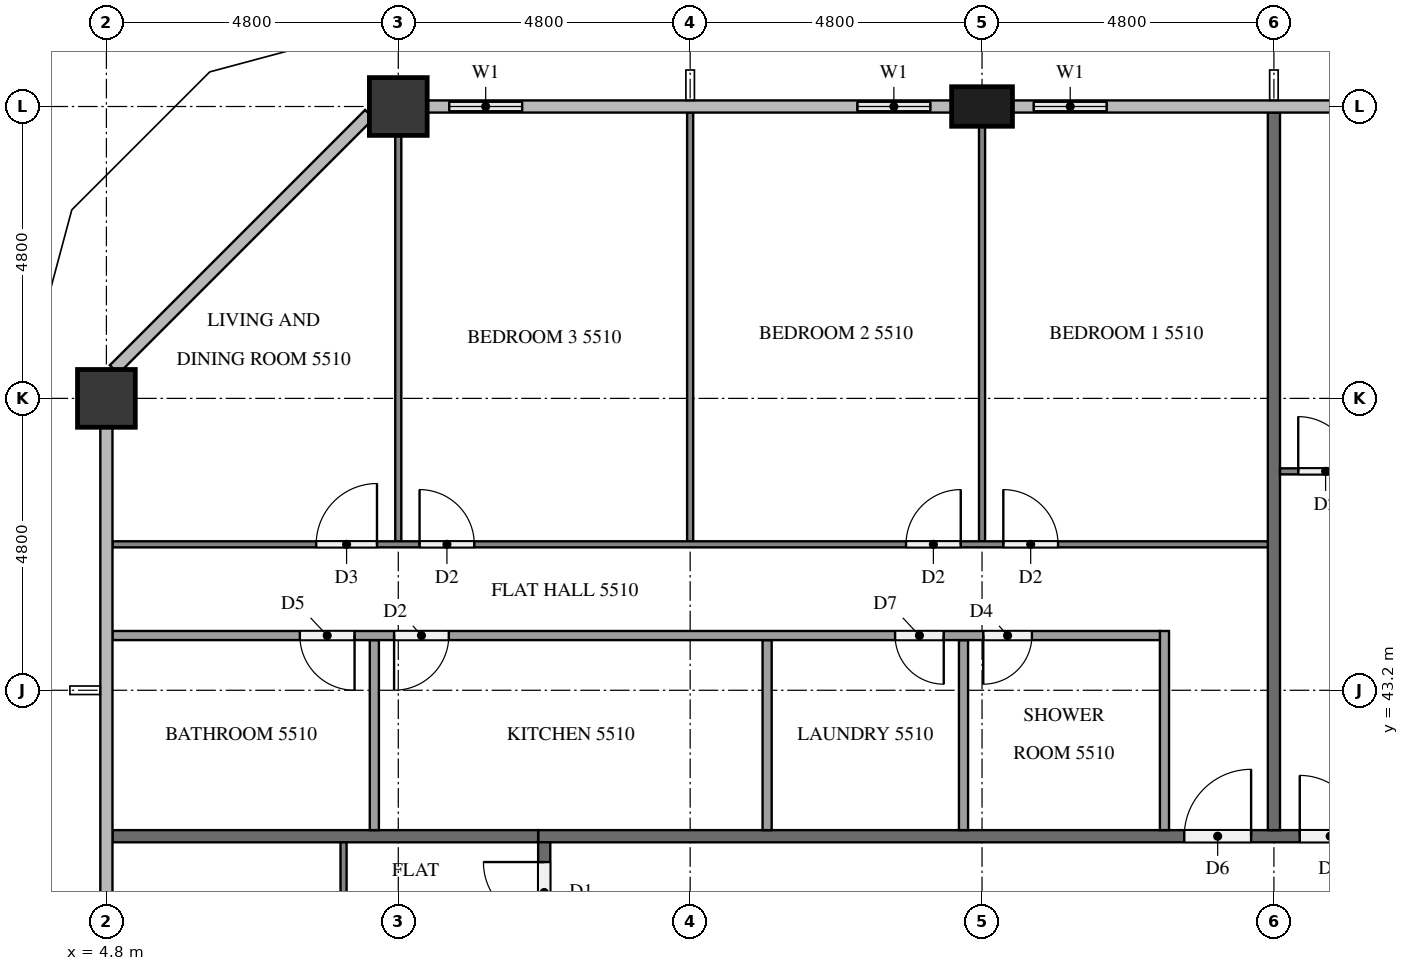
"""IFC4 building model, lengths in metres.
Left out: names, types, materials, properties, quantities, classifications, styles, units other than length and angle.
Written with IfcOpenShell. Run it as: python <this file> out.ifc"""

import sys

from ifc_helpers import new_model, si_unit, direction, frame, frame_2d, origin, origin_2d, place, context, subcontext, project, spatial, rectangle, extrude, element, fill, save


model = new_model("IFC4")
c1 = context("Model", 3, precision=1e-05, world=origin(), true_north=direction((0.0, 1.0)))
c2 = subcontext(c1, "Body", "Model", "MODEL_VIEW")
j1 = project(units=[si_unit("LENGTHUNIT", "METRE"), si_unit("PLANEANGLEUNIT", "RADIAN")], contexts=[c1])
p1 = place(None, origin())
s1 = spatial("IfcSite", under=j1, at=p1, CompositionType="ELEMENT")
p2 = place(p1, origin())
s2 = spatial("IfcBuilding", under=s1, at=p2, CompositionType="ELEMENT")
p3 = place(p2, frame((0.0, 0.0, 212.3)))
s3 = spatial("IfcBuildingStorey", under=s2, at=p3, CompositionType="ELEMENT", Elevation=212.3)
p4 = place(p3, frame((19.2, 52.8, 0.0), z_axis=(0.0, 0.0, 1.0), x_axis=(1.0, 0.0, 0.0)))
e1 = element("IfcColumn", 1, at=p4, inside=s3, PredefinedType="COLUMN", context=c2, shape_type="SweptSolid", body=[
    extrude(rectangle(XDim=1.0, YDim=0.65, at=origin_2d()), origin(), (0.0, 0.0, 1.0), 3.2),
])
for number, where, z_axis, x_axis in (
    (2, (9.6, 52.8, 0.0), (0.0, 0.0, 1.0), (1.0, 0.0, 0.0)),
    (3, (4.8, 48.0, 0.0), (0.0, 0.0, 1.0), (1.0, 0.0, 0.0)),
):
    element("IfcColumn", number, at=place(p3, frame(where, z_axis=z_axis, x_axis=x_axis)), inside=s3, PredefinedType="COLUMN", context=c2, shape_type="SweptSolid", body=[
        extrude(rectangle(XDim=0.95, YDim=0.95, at=origin_2d()), origin(), (0.0, 0.0, 1.0), 3.2),
    ])
p5 = place(p3, frame((21.6, 52.8, 0.0), z_axis=(0.0, 0.0, 1.0), x_axis=(-1.0, 0.0, 0.0)))
e4 = element("IfcWall", 4, at=p5, inside=s3, PredefinedType="SOLIDWALL", context=c2, shape_type="SweptSolid", body=[
    extrude(rectangle(XDim=1.9, YDim=0.15, at=frame_2d((0.95, 0.0))), origin(), (0.0, 0.0, 1.0), 3.2),
])
p6 = place(p5, frame((0.35, 0.0, 0.9)))
e5 = element("IfcOpeningElement", 5, at=p6, cuts=e4, PredefinedType="OPENING", context=c2, shape_type="SweptSolid", body=[
    extrude(rectangle(XDim=1.2, YDim=1.4, at=frame_2d((0.6, 0.7))), frame((0.0, 0.085, 0.0), z_axis=(0.0, -1.0, 0.0), x_axis=(1.0, 0.0, 0.0)), (0.0, 0.0, 1.0), 0.17),
])
p7 = place(p3, frame((18.7, 52.8, 0.0), z_axis=(0.0, 0.0, 1.0), x_axis=(-1.0, 0.0, 0.0)))
e6 = element("IfcWall", 6, at=p7, inside=s3, PredefinedType="SOLIDWALL", context=c2, shape_type="SweptSolid", body=[
    extrude(rectangle(XDim=1.9, YDim=0.15, at=frame_2d((0.95, 0.0))), origin(), (0.0, 0.0, 1.0), 3.2),
])
p8 = place(p7, frame((0.35, 0.0, 0.9)))
e7 = element("IfcOpeningElement", 7, at=p8, cuts=e6, PredefinedType="OPENING", context=c2, shape_type="SweptSolid", body=[
    extrude(rectangle(XDim=1.2, YDim=1.4, at=frame_2d((0.6, 0.7))), frame((0.0, 0.085, 0.0), z_axis=(0.0, -1.0, 0.0), x_axis=(1.0, 0.0, 0.0)), (0.0, 0.0, 1.0), 0.17),
])
p9 = place(p3, frame((12.0, 52.8, 0.0), z_axis=(0.0, 0.0, 1.0), x_axis=(-1.0, 0.0, 0.0)))
e8 = element("IfcWall", 8, at=p9, inside=s3, PredefinedType="SOLIDWALL", context=c2, shape_type="SweptSolid", body=[
    extrude(rectangle(XDim=1.925, YDim=0.15, at=frame_2d((0.962, 0.0))), origin(), (0.0, 0.0, 1.0), 3.2),
])
p10 = place(p9, frame((0.363, 0.0, 0.9)))
e9 = element("IfcOpeningElement", 9, at=p10, cuts=e8, PredefinedType="OPENING", context=c2, shape_type="SweptSolid", body=[
    extrude(rectangle(XDim=1.2, YDim=1.4, at=frame_2d((0.6, 0.7))), frame((0.0, 0.085, 0.0), z_axis=(0.0, -1.0, 0.0), x_axis=(1.0, 0.0, 0.0)), (0.0, 0.0, 1.0), 0.17),
])
p11 = place(p3, frame((11.9, 40.8, 0.0), z_axis=(0.0, 0.0, 1.0), x_axis=(1.0, 0.0, 0.0)))
e10 = element("IfcWall", 10, at=p11, inside=s3, PredefinedType="PARTITIONING", context=c2, shape_type="SweptSolid", body=[
    extrude(rectangle(XDim=38.6, YDim=0.2, at=frame_2d((19.3, 0.0))), origin(), (0.0, 0.0, 1.0), 3.2),
])
p12 = place(p11, frame((36.525, 0.0, 0.0)))
e11 = element("IfcOpeningElement", 11, at=p12, cuts=e10, PredefinedType="OPENING", context=c2, shape_type="SweptSolid", body=[
    extrude(rectangle(XDim=1.0, YDim=2.1, at=frame_2d((0.5, 1.05))), frame((0.0, 0.11, 0.0), z_axis=(0.0, -1.0, 0.0), x_axis=(1.0, 0.0, 0.0)), (0.0, 0.0, 1.0), 0.22),
])
p13 = place(p11, frame((29.325, 0.0, 0.0)))
e12 = element("IfcOpeningElement", 12, at=p13, cuts=e10, PredefinedType="OPENING", context=c2, shape_type="SweptSolid", body=[
    extrude(rectangle(XDim=1.0, YDim=2.1, at=frame_2d((0.5, 1.05))), frame((0.0, 0.11, 0.0), z_axis=(0.0, -1.0, 0.0), x_axis=(1.0, 0.0, 0.0)), (0.0, 0.0, 1.0), 0.22),
])
p14 = place(p11, frame((12.525, 0.0, 0.0)))
e13 = element("IfcOpeningElement", 13, at=p14, cuts=e10, PredefinedType="OPENING", context=c2, shape_type="SweptSolid", body=[
    extrude(rectangle(XDim=1.0, YDim=2.1, at=frame_2d((0.5, 1.05))), frame((0.0, 0.11, 0.0), z_axis=(0.0, -1.0, 0.0), x_axis=(1.0, 0.0, 0.0)), (0.0, 0.0, 1.0), 0.22),
])
p15 = place(p11, frame((10.625, 0.0, 0.0)))
e14 = element("IfcOpeningElement", 14, at=p15, cuts=e10, PredefinedType="OPENING", context=c2, shape_type="SweptSolid", body=[
    extrude(rectangle(XDim=1.1, YDim=2.1, at=frame_2d((0.55, 1.05))), frame((0.0, 0.11, 0.0), z_axis=(0.0, -1.0, 0.0), x_axis=(1.0, 0.0, 0.0)), (0.0, 0.0, 1.0), 0.22),
])
p16 = place(p3, frame((12.0, 12.1, 0.0), z_axis=(0.0, 0.0, 1.0), x_axis=(0.0, 1.0, 0.0)))
e15 = element("IfcWall", 15, at=p16, inside=s3, PredefinedType="PARTITIONING", context=c2, shape_type="SweptSolid", body=[
    extrude(rectangle(XDim=28.6, YDim=0.2, at=frame_2d((14.3, 0.0))), origin(), (0.0, 0.0, 1.0), 3.2),
])
p17 = place(p16, frame((27.275, 0.0, 0.0)))
e16 = element("IfcOpeningElement", 16, at=p17, cuts=e15, PredefinedType="OPENING", context=c2, shape_type="SweptSolid", body=[
    extrude(rectangle(XDim=1.0, YDim=2.1, at=frame_2d((0.5, 1.05))), frame((0.0, 0.11, 0.0), z_axis=(0.0, -1.0, 0.0), x_axis=(1.0, 0.0, 0.0)), (0.0, 0.0, 1.0), 0.22),
])
p18 = place(p16, frame((12.325, 0.0, 0.0)))
e17 = element("IfcOpeningElement", 17, at=p18, cuts=e15, PredefinedType="OPENING", context=c2, shape_type="SweptSolid", body=[
    extrude(rectangle(XDim=1.0, YDim=2.1, at=frame_2d((0.5, 1.05))), frame((0.0, 0.11, 0.0), z_axis=(0.0, -1.0, 0.0), x_axis=(1.0, 0.0, 0.0)), (0.0, 0.0, 1.0), 0.22),
])
p19 = place(p16, frame((2.725, 0.0, 0.0)))
e18 = element("IfcOpeningElement", 18, at=p19, cuts=e15, PredefinedType="OPENING", context=c2, shape_type="SweptSolid", body=[
    extrude(rectangle(XDim=1.0, YDim=2.1, at=frame_2d((0.5, 1.05))), frame((0.0, 0.11, 0.0), z_axis=(0.0, -1.0, 0.0), x_axis=(1.0, 0.0, 0.0)), (0.0, 0.0, 1.0), 0.22),
])
p20 = place(p16, frame((0.875, 0.0, 0.0)))
e19 = element("IfcOpeningElement", 19, at=p20, cuts=e15, PredefinedType="OPENING", context=c2, shape_type="SweptSolid", body=[
    extrude(rectangle(XDim=1.0, YDim=2.1, at=frame_2d((0.5, 1.05))), frame((0.0, 0.11, 0.0), z_axis=(0.0, -1.0, 0.0), x_axis=(1.0, 0.0, 0.0)), (0.0, 0.0, 1.0), 0.22),
])
p21 = place(p3, frame((24.0, 52.7, 0.0), z_axis=(0.0, 0.0, 1.0), x_axis=(0.0, -1.0, 0.0)))
e20 = element("IfcWall", 20, at=p21, inside=s3, PredefinedType="PARTITIONING", context=c2, shape_type="SweptSolid", body=[
    extrude(rectangle(XDim=11.8, YDim=0.2, at=frame_2d((5.9, 0.0))), origin(), (0.0, 0.0, 1.0), 3.2),
])
p22 = place(p3, frame((4.9, 40.8, 0.0), z_axis=(0.0, 0.0, 1.0), x_axis=(1.0, 0.0, 0.0)))
e21 = element("IfcWall", 21, at=p22, inside=s3, PredefinedType="PARTITIONING", context=c2, shape_type="SweptSolid", body=[
    extrude(rectangle(XDim=7.0, YDim=0.2, at=frame_2d((3.5, 0.0))), origin(), (0.0, 0.0, 1.0), 3.2),
])
p23 = place(p3, frame((24.1, 46.8, 0.0), z_axis=(0.0, 0.0, 1.0), x_axis=(1.0, 0.0, 0.0)))
e22 = element("IfcWall", 22, at=p23, inside=s3, PredefinedType="PARTITIONING", context=c2, shape_type="SweptSolid", body=[
    extrude(rectangle(XDim=16.6, YDim=0.1, at=frame_2d((8.3, 0.0))), origin(), (0.0, 0.0, 1.0), 3.2),
])
p24 = place(p23, frame((0.3, 0.0, 0.0)))
e23 = element("IfcOpeningElement", 23, at=p24, cuts=e22, PredefinedType="OPENING", context=c2, shape_type="SweptSolid", body=[
    extrude(rectangle(XDim=0.9, YDim=2.1, at=frame_2d((0.45, 1.05))), frame((0.0, 0.06, 0.0), z_axis=(0.0, -1.0, 0.0), x_axis=(1.0, 0.0, 0.0)), (0.0, 0.0, 1.0), 0.12),
])
p25 = place(p23, frame((10.55, 0.0, 0.0)))
e24 = element("IfcOpeningElement", 24, at=p25, cuts=e22, PredefinedType="OPENING", context=c2, shape_type="SweptSolid", body=[
    extrude(rectangle(XDim=1.0, YDim=2.1, at=frame_2d((0.5, 1.05))), frame((0.0, 0.06, 0.0), z_axis=(0.0, -1.0, 0.0), x_axis=(1.0, 0.0, 0.0)), (0.0, 0.0, 1.0), 0.12),
])
p26 = place(p23, frame((12.25, 0.0, 0.0)))
e25 = element("IfcOpeningElement", 25, at=p26, cuts=e22, PredefinedType="OPENING", context=c2, shape_type="SweptSolid", body=[
    extrude(rectangle(XDim=0.9, YDim=2.1, at=frame_2d((0.45, 1.05))), frame((0.0, 0.06, 0.0), z_axis=(0.0, -1.0, 0.0), x_axis=(1.0, 0.0, 0.0)), (0.0, 0.0, 1.0), 0.12),
])
p27 = place(p3, frame((19.2, 45.65, 0.0), z_axis=(0.0, 0.0, 1.0), x_axis=(0.0, 1.0, 0.0)))
e26 = element("IfcWall", 26, at=p27, inside=s3, PredefinedType="PARTITIONING", context=c2, shape_type="SweptSolid", body=[
    extrude(rectangle(XDim=6.825, YDim=0.1, at=frame_2d((3.413, 0.0))), origin(), (0.0, 0.0, 1.0), 3.2),
])
p28 = place(p3, frame((14.4, 45.65, 0.0), z_axis=(0.0, 0.0, 1.0), x_axis=(0.0, 1.0, 0.0)))
e27 = element("IfcWall", 27, at=p28, inside=s3, PredefinedType="PARTITIONING", context=c2, shape_type="SweptSolid", body=[
    extrude(rectangle(XDim=7.05, YDim=0.1, at=frame_2d((3.525, 0.0))), origin(), (0.0, 0.0, 1.0), 3.2),
])
p29 = place(p3, frame((9.6, 45.65, 0.0), z_axis=(0.0, 0.0, 1.0), x_axis=(0.0, 1.0, 0.0)))
e28 = element("IfcWall", 28, at=p29, inside=s3, PredefinedType="PARTITIONING", context=c2, shape_type="SweptSolid", body=[
    extrude(rectangle(XDim=6.675, YDim=0.1, at=frame_2d((3.337, 0.0))), origin(), (0.0, 0.0, 1.0), 3.2),
])
p30 = place(p3, frame((4.9, 45.6, 0.0), z_axis=(0.0, 0.0, 1.0), x_axis=(1.0, 0.0, 0.0)))
e29 = element("IfcWall", 29, at=p30, inside=s3, PredefinedType="PARTITIONING", context=c2, shape_type="SweptSolid", body=[
    extrude(rectangle(XDim=19.0, YDim=0.1, at=frame_2d((9.5, 0.0))), origin(), (0.0, 0.0, 1.0), 3.2),
])
p31 = place(p30, frame((14.65, 0.0, 0.0)))
e30 = element("IfcOpeningElement", 30, at=p31, cuts=e29, PredefinedType="OPENING", context=c2, shape_type="SweptSolid", body=[
    extrude(rectangle(XDim=0.9, YDim=2.1, at=frame_2d((0.45, 1.05))), frame((0.0, 0.06, 0.0), z_axis=(0.0, -1.0, 0.0), x_axis=(1.0, 0.0, 0.0)), (0.0, 0.0, 1.0), 0.12),
])
p32 = place(p30, frame((13.05, 0.0, 0.0)))
e31 = element("IfcOpeningElement", 31, at=p32, cuts=e29, PredefinedType="OPENING", context=c2, shape_type="SweptSolid", body=[
    extrude(rectangle(XDim=0.9, YDim=2.1, at=frame_2d((0.45, 1.05))), frame((0.0, 0.06, 0.0), z_axis=(0.0, -1.0, 0.0), x_axis=(1.0, 0.0, 0.0)), (0.0, 0.0, 1.0), 0.12),
])
p33 = place(p30, frame((5.05, 0.0, 0.0)))
e32 = element("IfcOpeningElement", 32, at=p33, cuts=e29, PredefinedType="OPENING", context=c2, shape_type="SweptSolid", body=[
    extrude(rectangle(XDim=0.9, YDim=2.1, at=frame_2d((0.45, 1.05))), frame((0.0, 0.06, 0.0), z_axis=(0.0, -1.0, 0.0), x_axis=(1.0, 0.0, 0.0)), (0.0, 0.0, 1.0), 0.12),
])
p34 = place(p30, frame((3.35, 0.0, 0.0)))
e33 = element("IfcOpeningElement", 33, at=p34, cuts=e29, PredefinedType="OPENING", context=c2, shape_type="SweptSolid", body=[
    extrude(rectangle(XDim=1.0, YDim=2.1, at=frame_2d((0.5, 1.05))), frame((0.0, 0.06, 0.0), z_axis=(0.0, -1.0, 0.0), x_axis=(1.0, 0.0, 0.0)), (0.0, 0.0, 1.0), 0.12),
])
for number, where, z_axis, x_axis in (
    (34, (18.895, 40.9, 0.0), (0.0, 0.0, 1.0), (0.0, 1.0, 0.0)),
    (35, (15.666, 40.9, 0.0), (0.0, 0.0, 1.0), (0.0, 1.0, 0.0)),
    (36, (9.206, 40.9, 0.0), (0.0, 0.0, 1.0), (0.0, 1.0, 0.0)),
):
    element("IfcWall", number, at=place(p3, frame(where, z_axis=z_axis, x_axis=x_axis)), inside=s3, PredefinedType="PARTITIONING", context=c2, shape_type="SweptSolid", body=[
        extrude(rectangle(XDim=3.125, YDim=0.15, at=frame_2d((1.562, 0.0))), origin(), (0.0, 0.0, 1.0), 3.2),
    ])
p35 = place(p3, frame((22.2, 40.9, 0.0), z_axis=(0.0, 0.0, 1.0), x_axis=(0.0, 1.0, 0.0)))
e37 = element("IfcWall", 37, at=p35, inside=s3, PredefinedType="PARTITIONING", context=c2, shape_type="SweptSolid", body=[
    extrude(rectangle(XDim=3.275, YDim=0.15, at=frame_2d((1.638, 0.0))), origin(), (0.0, 0.0, 1.0), 3.2),
])
p36 = place(p3, frame((22.125, 44.1, 0.0), z_axis=(0.0, 0.0, 1.0), x_axis=(-1.0, 0.0, 0.0)))
e38 = element("IfcWall", 38, at=p36, inside=s3, PredefinedType="PARTITIONING", context=c2, shape_type="SweptSolid", body=[
    extrude(rectangle(XDim=17.225, YDim=0.15, at=frame_2d((8.613, 0.0))), origin(), (0.0, 0.0, 1.0), 3.2),
])
p37 = place(p36, frame((2.105, 0.0, 0.0)))
e39 = element("IfcOpeningElement", 39, at=p37, cuts=e38, PredefinedType="OPENING", context=c2, shape_type="SweptSolid", body=[
    extrude(rectangle(XDim=0.8, YDim=2.1, at=frame_2d((0.4, 1.05))), frame((0.0, 0.085, 0.0), z_axis=(0.0, -1.0, 0.0), x_axis=(1.0, 0.0, 0.0)), (0.0, 0.0, 1.0), 0.17),
])
p38 = place(p36, frame((3.555, 0.0, 0.0)))
e40 = element("IfcOpeningElement", 40, at=p38, cuts=e38, PredefinedType="OPENING", context=c2, shape_type="SweptSolid", body=[
    extrude(rectangle(XDim=0.8, YDim=2.1, at=frame_2d((0.4, 1.05))), frame((0.0, 0.085, 0.0), z_axis=(0.0, -1.0, 0.0), x_axis=(1.0, 0.0, 0.0)), (0.0, 0.0, 1.0), 0.17),
])
p39 = place(p36, frame((11.694, 0.0, 0.0)))
e41 = element("IfcOpeningElement", 41, at=p39, cuts=e38, PredefinedType="OPENING", context=c2, shape_type="SweptSolid", body=[
    extrude(rectangle(XDim=0.9, YDim=2.1, at=frame_2d((0.45, 1.05))), frame((0.0, 0.085, 0.0), z_axis=(0.0, -1.0, 0.0), x_axis=(1.0, 0.0, 0.0)), (0.0, 0.0, 1.0), 0.17),
])
p40 = place(p36, frame((13.244, 0.0, 0.0)))
e42 = element("IfcOpeningElement", 42, at=p40, cuts=e38, PredefinedType="OPENING", context=c2, shape_type="SweptSolid", body=[
    extrude(rectangle(XDim=0.9, YDim=2.1, at=frame_2d((0.45, 1.05))), frame((0.0, 0.085, 0.0), z_axis=(0.0, -1.0, 0.0), x_axis=(1.0, 0.0, 0.0)), (0.0, 0.0, 1.0), 0.17),
])
p41 = place(p3, frame((8.7, 33.7, 0.0), z_axis=(0.0, 0.0, 1.0), x_axis=(0.0, 1.0, 0.0)))
e43 = element("IfcWall", 43, at=p41, inside=s3, PredefinedType="PARTITIONING", context=c2, shape_type="SweptSolid", body=[
    extrude(rectangle(XDim=7.0, YDim=0.1, at=frame_2d((3.5, 0.0))), origin(), (0.0, 0.0, 1.0), 3.2),
])
p42 = place(p41, frame((0.3, 0.0, 0.0)))
e44 = element("IfcOpeningElement", 44, at=p42, cuts=e43, PredefinedType="OPENING", context=c2, shape_type="SweptSolid", body=[
    extrude(rectangle(XDim=1.0, YDim=2.1, at=frame_2d((0.5, 1.05))), frame((0.0, 0.06, 0.0), z_axis=(0.0, -1.0, 0.0), x_axis=(1.0, 0.0, 0.0)), (0.0, 0.0, 1.0), 0.12),
])
p43 = place(p6, origin())
e45 = element("IfcWindow", 45, at=p43, inside=s3, PartitioningType="SINGLE_PANEL", PredefinedType="WINDOW", context=c2, shape_type="SweptSolid", body=[
    extrude(rectangle(XDim=1.2, YDim=1.4, at=frame_2d((0.6, 0.7))), frame((0.0, 0.03, 0.0), z_axis=(0.0, -1.0, 0.0), x_axis=(1.0, 0.0, 0.0)), (0.0, 0.0, 1.0), 0.06),
])
fill(e5, e45)
p44 = place(p8, origin())
e46 = element("IfcWindow", 46, at=p44, inside=s3, PartitioningType="SINGLE_PANEL", PredefinedType="WINDOW", context=c2, shape_type="SweptSolid", body=[
    extrude(rectangle(XDim=1.2, YDim=1.4, at=frame_2d((0.6, 0.7))), frame((0.0, 0.03, 0.0), z_axis=(0.0, -1.0, 0.0), x_axis=(1.0, 0.0, 0.0)), (0.0, 0.0, 1.0), 0.06),
])
fill(e7, e46)
p45 = place(p10, origin())
e47 = element("IfcWindow", 47, at=p45, inside=s3, PartitioningType="SINGLE_PANEL", PredefinedType="WINDOW", context=c2, shape_type="SweptSolid", body=[
    extrude(rectangle(XDim=1.2, YDim=1.4, at=frame_2d((0.6, 0.7))), frame((0.0, 0.03, 0.0), z_axis=(0.0, -1.0, 0.0), x_axis=(1.0, 0.0, 0.0)), (0.0, 0.0, 1.0), 0.06),
])
fill(e9, e47)
p46 = place(p14, origin())
e48 = element("IfcDoor", 48, at=p46, inside=s3, OperationType="SINGLE_SWING_LEFT", PredefinedType="DOOR", context=c2, shape_type="SweptSolid", body=[
    extrude(rectangle(XDim=1.0, YDim=2.1, at=frame_2d((0.5, 1.05))), frame((0.0, 0.025, 0.0), z_axis=(0.0, -1.0, 0.0), x_axis=(1.0, 0.0, 0.0)), (0.0, 0.0, 1.0), 0.05),
])
fill(e13, e48)
p47 = place(p15, origin())
e49 = element("IfcDoor", 49, at=p47, inside=s3, OperationType="SINGLE_SWING_RIGHT", PredefinedType="DOOR", context=c2, shape_type="SweptSolid", body=[
    extrude(rectangle(XDim=1.1, YDim=2.1, at=frame_2d((0.55, 1.05))), frame((0.0, 0.025, 0.0), z_axis=(0.0, -1.0, 0.0), x_axis=(1.0, 0.0, 0.0)), (0.0, 0.0, 1.0), 0.05),
])
fill(e14, e49)
p48 = place(p17, origin())
e50 = element("IfcDoor", 50, at=p48, inside=s3, OperationType="SINGLE_SWING_RIGHT", PredefinedType="DOOR", context=c2, shape_type="SweptSolid", body=[
    extrude(rectangle(XDim=1.0, YDim=2.1, at=frame_2d((0.5, 1.05))), frame((0.0, 0.025, 0.0), z_axis=(0.0, -1.0, 0.0), x_axis=(1.0, 0.0, 0.0)), (0.0, 0.0, 1.0), 0.05),
])
fill(e16, e50)
p49 = place(p24, origin())
e51 = element("IfcDoor", 51, at=p49, inside=s3, OperationType="SINGLE_SWING_LEFT", PredefinedType="DOOR", context=c2, shape_type="SweptSolid", body=[
    extrude(rectangle(XDim=0.9, YDim=2.1, at=frame_2d((0.45, 1.05))), frame((0.0, 0.025, 0.0), z_axis=(0.0, -1.0, 0.0), x_axis=(1.0, 0.0, 0.0)), (0.0, 0.0, 1.0), 0.05),
])
fill(e23, e51)
p50 = place(p31, origin())
e52 = element("IfcDoor", 52, at=p50, inside=s3, OperationType="SINGLE_SWING_LEFT", PredefinedType="DOOR", context=c2, shape_type="SweptSolid", body=[
    extrude(rectangle(XDim=0.9, YDim=2.1, at=frame_2d((0.45, 1.05))), frame((0.0, 0.025, 0.0), z_axis=(0.0, -1.0, 0.0), x_axis=(1.0, 0.0, 0.0)), (0.0, 0.0, 1.0), 0.05),
])
fill(e30, e52)
p51 = place(p32, origin())
e53 = element("IfcDoor", 53, at=p51, inside=s3, OperationType="SINGLE_SWING_RIGHT", PredefinedType="DOOR", context=c2, shape_type="SweptSolid", body=[
    extrude(rectangle(XDim=0.9, YDim=2.1, at=frame_2d((0.45, 1.05))), frame((0.0, 0.025, 0.0), z_axis=(0.0, -1.0, 0.0), x_axis=(1.0, 0.0, 0.0)), (0.0, 0.0, 1.0), 0.05),
])
fill(e31, e53)
p52 = place(p33, origin())
e54 = element("IfcDoor", 54, at=p52, inside=s3, OperationType="SINGLE_SWING_LEFT", PredefinedType="DOOR", context=c2, shape_type="SweptSolid", body=[
    extrude(rectangle(XDim=0.9, YDim=2.1, at=frame_2d((0.45, 1.05))), frame((0.0, 0.025, 0.0), z_axis=(0.0, -1.0, 0.0), x_axis=(1.0, 0.0, 0.0)), (0.0, 0.0, 1.0), 0.05),
])
fill(e32, e54)
p53 = place(p34, origin())
e55 = element("IfcDoor", 55, at=p53, inside=s3, OperationType="SINGLE_SWING_RIGHT", PredefinedType="DOOR", context=c2, shape_type="SweptSolid", body=[
    extrude(rectangle(XDim=1.0, YDim=2.1, at=frame_2d((0.5, 1.05))), frame((0.0, 0.025, 0.0), z_axis=(0.0, -1.0, 0.0), x_axis=(1.0, 0.0, 0.0)), (0.0, 0.0, 1.0), 0.05),
])
fill(e33, e55)
p54 = place(p37, origin())
e56 = element("IfcDoor", 56, at=p54, inside=s3, OperationType="SINGLE_SWING_RIGHT", PredefinedType="DOOR", context=c2, shape_type="SweptSolid", body=[
    extrude(rectangle(XDim=0.8, YDim=2.1, at=frame_2d((0.4, 1.05))), frame((0.0, 0.025, 0.0), z_axis=(0.0, -1.0, 0.0), x_axis=(1.0, 0.0, 0.0)), (0.0, 0.0, 1.0), 0.05),
])
fill(e39, e56)
p55 = place(p38, origin())
e57 = element("IfcDoor", 57, at=p55, inside=s3, OperationType="SINGLE_SWING_LEFT", PredefinedType="DOOR", context=c2, shape_type="SweptSolid", body=[
    extrude(rectangle(XDim=0.8, YDim=2.1, at=frame_2d((0.4, 1.05))), frame((0.0, 0.025, 0.0), z_axis=(0.0, -1.0, 0.0), x_axis=(1.0, 0.0, 0.0)), (0.0, 0.0, 1.0), 0.05),
])
fill(e40, e57)
p56 = place(p39, origin())
e58 = element("IfcDoor", 58, at=p56, inside=s3, OperationType="SINGLE_SWING_RIGHT", PredefinedType="DOOR", context=c2, shape_type="SweptSolid", body=[
    extrude(rectangle(XDim=0.9, YDim=2.1, at=frame_2d((0.45, 1.05))), frame((0.0, 0.025, 0.0), z_axis=(0.0, -1.0, 0.0), x_axis=(1.0, 0.0, 0.0)), (0.0, 0.0, 1.0), 0.05),
])
fill(e41, e58)
p57 = place(p40, origin())
e59 = element("IfcDoor", 59, at=p57, inside=s3, OperationType="SINGLE_SWING_LEFT", PredefinedType="DOOR", context=c2, shape_type="SweptSolid", body=[
    extrude(rectangle(XDim=0.9, YDim=2.1, at=frame_2d((0.45, 1.05))), frame((0.0, 0.025, 0.0), z_axis=(0.0, -1.0, 0.0), x_axis=(1.0, 0.0, 0.0)), (0.0, 0.0, 1.0), 0.05),
])
fill(e42, e59)
save(model, sys.argv[1])
